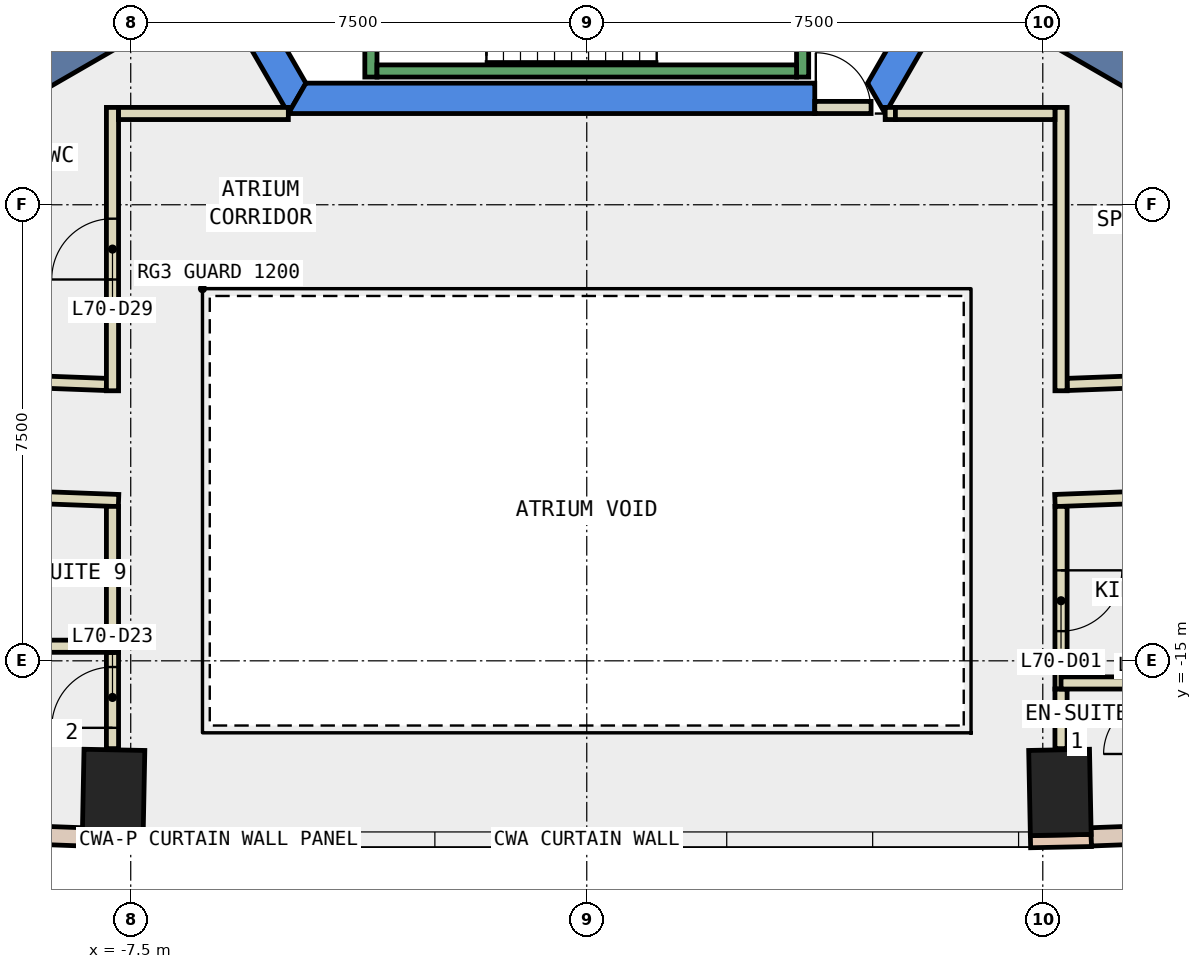
"""IFC4 building model, lengths in metres.
Left out: names, types, materials, properties, quantities, classifications, styles, units other than length and angle.
Written with IfcOpenShell. Run it as: python <this file> out.ifc"""

import sys

from ifc_helpers import new_model, si_unit, direction, frame, frame_2d, origin, origin_2d, place, context, subcontext, project, spatial, polyline, rectangle, outline, extrude, element, fill, save


model = new_model("IFC4")
c1 = context("Model", 3, precision=1e-05, world=origin(), true_north=direction((0.0, 1.0)))
c2 = subcontext(c1, "Body", "Model", "MODEL_VIEW")
j1 = project(units=[si_unit("LENGTHUNIT", "METRE"), si_unit("PLANEANGLEUNIT", "RADIAN")], contexts=[c1])
p1 = place(None, origin())
s1 = spatial("IfcSite", under=j1, at=p1, CompositionType="ELEMENT")
p2 = place(p1, origin())
s2 = spatial("IfcBuilding", under=s1, at=p2, CompositionType="ELEMENT")
p3 = place(p2, frame((0.0, 0.0, 300.8)))
s3 = spatial("IfcBuildingStorey", under=s2, at=p3, CompositionType="ELEMENT", Elevation=300.8)
for number, where, z_axis, x_axis in (
    (1, (-7.782, -17.164, -0.34), (0.0, 0.0, 1.0), (-1.0, 0.02, 0.0)),
    (2, (7.782, -17.164, -0.34), (0.0, 0.0, 1.0), (1.0, 0.02, 0.0)),
):
    element("IfcColumn", number, at=place(p3, frame(where, z_axis=z_axis, x_axis=x_axis)), inside=s3, PredefinedType="COLUMN", context=c2, shape_type="SweptSolid", body=[
        extrude(rectangle(XDim=1.0, YDim=1.4, at=origin_2d()), origin(), (0.0, 0.0, 1.0), 3.6),
    ])
p4 = place(p3, frame((0.0, 0.0, -0.34)))
e3 = element("IfcWall", 3, at=p4, inside=s3, PredefinedType="SHEAR", context=c2, shape_type="SweptSolid", body=[
    extrude(outline(polyline([(-9.815, 2.5), (-4.907, -6.0), (-4.619, -5.5), (-9.238, 2.5), (-9.815, 2.5)])), origin(), (0.0, 0.0, 1.0), 3.6),
])
p5 = place(p3, frame((0.0, 0.0, -0.34)))
e4 = element("IfcWall", 4, at=p5, inside=s3, PredefinedType="SHEAR", context=c2, shape_type="SweptSolid", body=[
    extrude(outline(polyline([(3.75, -6.0), (3.75, -5.5), (-4.619, -5.5), (-4.907, -6.0), (3.75, -6.0)])), origin(), (0.0, 0.0, 1.0), 3.6),
])
p6 = place(p3, frame((0.0, 0.0, -0.34)))
e5 = element("IfcWall", 5, at=p6, inside=s3, PredefinedType="SHEAR", context=c2, shape_type="SweptSolid", body=[
    extrude(outline(polyline([(4.907, -6.0), (9.815, 2.5), (9.238, 2.5), (4.619, -5.5), (4.907, -6.0)])), origin(), (0.0, 0.0, 1.0), 3.6),
])
for number, where, z_axis, x_axis in (
    (6, (6.279, -3.625, -0.34), (0.0, 0.0, 1.0), (0.866, -0.5, 0.0)),
    (7, (-6.279, -3.625, -0.34), (0.0, 0.0, 1.0), (-0.866, -0.5, 0.0)),
):
    element("IfcWall", number, at=place(p3, frame(where, z_axis=z_axis, x_axis=x_axis)), inside=s3, PredefinedType="SHEAR", context=c2, shape_type="SweptSolid", body=[
        extrude(rectangle(XDim=9.0, YDim=0.8, at=frame_2d((4.5, 0.0))), origin(), (0.0, 0.0, 1.0), 3.6),
    ])
for number, where, z_axis, x_axis in (
    (8, (-8.298, -17.954, 0.0), (0.0, 0.0, 1.0), (1.0, -0.02, 0.0)),
    (9, (7.298, -17.974, 0.0), (0.0, 0.0, 1.0), (1.0, 0.02, 0.0)),
):
    element("IfcWall", number, at=place(p3, frame(where, z_axis=z_axis, x_axis=x_axis)), inside=s3, PredefinedType="STANDARD", context=c2, shape_type="SweptSolid", body=[
        extrude(rectangle(XDim=1.0, YDim=0.2, at=frame_2d((0.5, 0.0))), origin(), (0.0, 0.0, 1.0), 3.26),
    ])
p7 = place(p3, frame((-11.92, -17.76, 0.0), z_axis=(0.0, 0.0, 1.0), x_axis=(0.999306787149, -0.037228284377, 0.0)))
e10 = element("IfcWall", 10, at=p7, inside=s3, PredefinedType="STANDARD", context=c2, shape_type="SweptSolid", body=[
    extrude(rectangle(XDim=3.626, YDim=0.3, at=frame_2d((1.813, 0.0))), origin(), (0.0, 0.0, 1.0), 3.26),
])
p8 = place(p7, frame((1.113, 0.0, 0.9)))
e11 = element("IfcOpeningElement", 11, at=p8, cuts=e10, PredefinedType="OPENING", context=c2, shape_type="SweptSolid", body=[
    extrude(rectangle(XDim=1.4, YDim=2.0, at=frame_2d((0.7, 1.0))), frame((0.0, 0.16, 0.0), z_axis=(0.0, -1.0, 0.0), x_axis=(1.0, 0.0, 0.0)), (0.0, 0.0, 1.0), 0.32),
])
p9 = place(p3, frame((8.296, -17.895, 0.0), z_axis=(0.0, 0.0, 1.0), x_axis=(0.999306787149, 0.037228284377, 0.0)))
e12 = element("IfcWall", 12, at=p9, inside=s3, PredefinedType="STANDARD", context=c2, shape_type="SweptSolid", body=[
    extrude(rectangle(XDim=3.626, YDim=0.3, at=frame_2d((1.813, 0.0))), origin(), (0.0, 0.0, 1.0), 3.26),
])
p10 = place(p9, frame((1.113, 0.0, 0.9)))
e13 = element("IfcOpeningElement", 13, at=p10, cuts=e12, PredefinedType="OPENING", context=c2, shape_type="SweptSolid", body=[
    extrude(rectangle(XDim=1.4, YDim=2.0, at=frame_2d((0.7, 1.0))), frame((0.0, 0.16, 0.0), z_axis=(0.0, -1.0, 0.0), x_axis=(1.0, 0.0, 0.0)), (0.0, 0.0, 1.0), 0.32),
])
p11 = place(p3, frame((7.9, -10.455, 0.0), z_axis=(0.0, 0.0, 1.0), x_axis=(0.999297278907, 0.037482640915, 0.0)))
e14 = element("IfcWall", 14, at=p11, inside=s3, PredefinedType="PARTITIONING", context=c2, shape_type="SweptSolid", body=[
    extrude(rectangle(XDim=3.394, YDim=0.2, at=frame_2d((1.697, 0.0))), origin(), (0.0, 0.0, 1.0), 3.26),
])
p12 = place(p11, frame((1.196, 0.0, 0.0)))
e15 = element("IfcOpeningElement", 15, at=p12, cuts=e14, PredefinedType="OPENING", context=c2, shape_type="SweptSolid", body=[
    extrude(rectangle(XDim=1.0, YDim=2.1, at=frame_2d((0.5, 1.05))), frame((0.0, 0.11, 0.0), z_axis=(0.0, -1.0, 0.0), x_axis=(1.0, 0.0, 0.0)), (0.0, 0.0, 1.0), 0.22),
])
p13 = place(p3, frame((-9.902, -10.38, 0.0), z_axis=(0.0, 0.0, 1.0), x_axis=(0.999295503749, -0.037529937222, 0.0)))
e16 = element("IfcWall", 16, at=p13, inside=s3, PredefinedType="PARTITIONING", context=c2, shape_type="SweptSolid", body=[
    extrude(rectangle(XDim=2.004, YDim=0.2, at=frame_2d((1.002, 0.0))), origin(), (0.0, 0.0, 1.0), 3.26),
])
p14 = place(p3, frame((11.53, -12.22, 0.0), z_axis=(0.0, 0.0, 1.0), x_axis=(-0.999293554816, -0.037581794833, 0.0)))
e17 = element("IfcWall", 17, at=p14, inside=s3, PredefinedType="PARTITIONING", context=c2, shape_type="SweptSolid", body=[
    extrude(rectangle(XDim=3.833, YDim=0.2, at=frame_2d((1.917, 0.0))), origin(), (0.0, 0.0, 1.0), 3.26),
])
p15 = place(p3, frame((-7.7, -12.364, 0.0), z_axis=(0.0, 0.0, 1.0), x_axis=(-0.999295758095, 0.037523164215, 0.0)))
e18 = element("IfcWall", 18, at=p15, inside=s3, PredefinedType="PARTITIONING", context=c2, shape_type="SweptSolid", body=[
    extrude(rectangle(XDim=2.401, YDim=0.2, at=frame_2d((1.2, 0.0))), origin(), (0.0, 0.0, 1.0), 3.26),
])
p16 = place(p3, frame((4.908, -5.999, 0.0), z_axis=(0.0, 0.0, 1.0), x_axis=(1.0, 0.0, 0.0)))
e19 = element("IfcWall", 19, at=p16, inside=s3, PredefinedType="PARTITIONING", context=c2, shape_type="SweptSolid", body=[
    extrude(rectangle(XDim=0.168, YDim=0.2, at=frame_2d((0.084, 0.0))), origin(), (0.0, 0.0, 1.0), 2.4),
])
p17 = place(p3, frame((7.8, -5.899, 0.0), z_axis=(0.0, 0.0, 1.0), x_axis=(0.0, -1.0, 0.0)))
e20 = element("IfcWall", 20, at=p17, inside=s3, PredefinedType="PARTITIONING", context=c2, shape_type="SweptSolid", body=[
    extrude(rectangle(XDim=4.66, YDim=0.2, at=frame_2d((2.33, 0.0))), origin(), (0.0, 0.0, 1.0), 3.26),
])
p18 = place(p3, frame((-7.8, -10.559, 0.0), z_axis=(0.0, 0.0, 1.0), x_axis=(0.0, 1.0, 0.0)))
e21 = element("IfcWall", 21, at=p18, inside=s3, PredefinedType="PARTITIONING", context=c2, shape_type="SweptSolid", body=[
    extrude(rectangle(XDim=4.66, YDim=0.2, at=frame_2d((2.33, 0.0))), origin(), (0.0, 0.0, 1.0), 3.26),
])
p19 = place(p18, frame((1.83, 0.0, 0.0)))
e22 = element("IfcOpeningElement", 22, at=p19, cuts=e21, PredefinedType="OPENING", context=c2, shape_type="SweptSolid", body=[
    extrude(rectangle(XDim=1.0, YDim=2.1, at=frame_2d((0.5, 1.05))), frame((0.0, 0.11, 0.0), z_axis=(0.0, -1.0, 0.0), x_axis=(1.0, 0.0, 0.0)), (0.0, 0.0, 1.0), 0.22),
])
p20 = place(p3, frame((-7.7, -5.999, 0.0), z_axis=(0.0, 0.0, 1.0), x_axis=(1.0, 0.0, 0.0)))
e23 = element("IfcWall", 23, at=p20, inside=s3, PredefinedType="PARTITIONING", context=c2, shape_type="SweptSolid", body=[
    extrude(rectangle(XDim=2.792, YDim=0.2, at=frame_2d((1.396, 0.0))), origin(), (0.0, 0.0, 1.0), 3.26),
])
p21 = place(p3, frame((7.8, -12.46, 0.0), z_axis=(0.0, 0.0, 1.0), x_axis=(0.0, -1.0, 0.0)))
e24 = element("IfcWall", 24, at=p21, inside=s3, PredefinedType="PARTITIONING", context=c2, shape_type="SweptSolid", body=[
    extrude(rectangle(XDim=3.004, YDim=0.2, at=frame_2d((1.502, 0.0))), origin(), (0.0, 0.0, 1.0), 3.26),
])
p22 = place(p21, frame((1.052, 0.0, 0.0)))
e25 = element("IfcOpeningElement", 25, at=p22, cuts=e24, PredefinedType="OPENING", context=c2, shape_type="SweptSolid", body=[
    extrude(rectangle(XDim=1.0, YDim=2.1, at=frame_2d((0.5, 1.05))), frame((0.0, 0.11, 0.0), z_axis=(0.0, -1.0, 0.0), x_axis=(1.0, 0.0, 0.0)), (0.0, 0.0, 1.0), 0.22),
])
p23 = place(p3, frame((7.8, -15.464, 0.0), z_axis=(0.0, 0.0, 1.0), x_axis=(0.0, -1.0, 0.0)))
e26 = element("IfcWall", 26, at=p23, inside=s3, PredefinedType="PARTITIONING", context=c2, shape_type="SweptSolid", body=[
    extrude(rectangle(XDim=0.98, YDim=0.2, at=frame_2d((0.49, 0.0))), origin(), (0.0, 0.0, 1.0), 3.26),
])
p24 = place(p3, frame((-7.8, -16.444, 0.0), z_axis=(0.0, 0.0, 1.0), x_axis=(0.0, 1.0, 0.0)))
e27 = element("IfcWall", 27, at=p24, inside=s3, PredefinedType="PARTITIONING", context=c2, shape_type="SweptSolid", body=[
    extrude(rectangle(XDim=1.584, YDim=0.2, at=frame_2d((0.792, 0.0))), origin(), (0.0, 0.0, 1.0), 3.26),
])
p25 = place(p24, frame((0.342, 0.0, 0.0)))
e28 = element("IfcOpeningElement", 28, at=p25, cuts=e27, PredefinedType="OPENING", context=c2, shape_type="SweptSolid", body=[
    extrude(rectangle(XDim=1.0, YDim=2.1, at=frame_2d((0.5, 1.05))), frame((0.0, 0.11, 0.0), z_axis=(0.0, -1.0, 0.0), x_axis=(1.0, 0.0, 0.0)), (0.0, 0.0, 1.0), 0.22),
])
p26 = place(p3, frame((-7.8, -14.86, 0.0), z_axis=(0.0, 0.0, 1.0), x_axis=(0.0, 1.0, 0.0)))
e29 = element("IfcWall", 29, at=p26, inside=s3, PredefinedType="PARTITIONING", context=c2, shape_type="SweptSolid", body=[
    extrude(rectangle(XDim=2.4, YDim=0.2, at=frame_2d((1.2, 0.0))), origin(), (0.0, 0.0, 1.0), 3.26),
])
p27 = place(p3, frame((6.835, -2.662, 0.0), z_axis=(0.0, 0.0, 1.0), x_axis=(0.866023427642, -0.500003422764, 0.0)))
e30 = element("IfcWall", 30, at=p27, inside=s3, PredefinedType="PARTITIONING", context=c2, shape_type="SweptSolid", body=[
    extrude(rectangle(XDim=8.65, YDim=0.1, at=frame_2d((4.325, 0.0))), origin(), (0.0, 0.0, 1.0), 3.26),
])
p28 = place(p3, frame((-6.804, -2.714, 0.0), z_axis=(0.0, 0.0, 1.0), x_axis=(-0.866057565063, -0.499944290893, 0.0)))
e31 = element("IfcWall", 31, at=p28, inside=s3, PredefinedType="PARTITIONING", context=c2, shape_type="SweptSolid", body=[
    extrude(rectangle(XDim=6.7, YDim=0.2, at=frame_2d((3.35, 0.0))), origin(), (0.0, 0.0, 1.0), 3.26),
])
p29 = place(p3, frame((9.3, -15.364, 0.0), z_axis=(0.0, 0.0, 1.0), x_axis=(-1.0, 0.0, 0.0)))
e32 = element("IfcWall", 32, at=p29, inside=s3, PredefinedType="PARTITIONING", context=c2, shape_type="SweptSolid", body=[
    extrude(rectangle(XDim=1.5, YDim=0.2, at=frame_2d((0.75, 0.0))), origin(), (0.0, 0.0, 1.0), 3.26),
])
p30 = place(p3, frame((-10.1, -14.76, 0.0), z_axis=(0.0, 0.0, 1.0), x_axis=(1.0, 0.0, 0.0)))
e33 = element("IfcWall", 33, at=p30, inside=s3, PredefinedType="PARTITIONING", context=c2, shape_type="SweptSolid", body=[
    extrude(rectangle(XDim=2.3, YDim=0.2, at=frame_2d((1.15, 0.0))), origin(), (0.0, 0.0, 1.0), 3.26),
])
p31 = place(p3, frame((3.75, -5.9, 0.0), z_axis=(0.0, 0.0, 1.0), x_axis=(1.0, 0.0, 0.0)))
e34 = element("IfcWall", 34, at=p31, inside=s3, PredefinedType="PARTITIONING", context=c2, shape_type="SweptSolid", body=[
    extrude(rectangle(XDim=0.926, YDim=0.2, at=frame_2d((0.463, 0.0))), origin(), (0.0, 0.0, 1.0), 2.4),
])
p32 = place(p31, frame((0.017, 0.0, 0.0)))
e35 = element("IfcOpeningElement", 35, at=p32, cuts=e34, PredefinedType="OPENING", context=c2, shape_type="SweptSolid", body=[
    extrude(rectangle(XDim=0.9, YDim=2.1, at=frame_2d((0.45, 1.05))), frame((0.0, 0.11, 0.0), z_axis=(0.0, -1.0, 0.0), x_axis=(1.0, 0.0, 0.0)), (0.0, 0.0, 1.0), 0.22),
])
p33 = place(p3, frame((5.076, -5.999, 0.0), z_axis=(0.0, 0.0, 1.0), x_axis=(1.0, 0.0, 0.0)))
e36 = element("IfcWall", 36, at=p33, inside=s3, PredefinedType="PARTITIONING", context=c2, shape_type="SweptSolid", body=[
    extrude(rectangle(XDim=2.624, YDim=0.2, at=frame_2d((1.312, 0.0))), origin(), (0.0, 0.0, 1.0), 3.26),
])
p34 = place(p3, frame((-3.55, -1.0, 0.0), z_axis=(0.0, 0.0, 1.0), x_axis=(0.0, -1.0, 0.0)))
e37 = element("IfcWall", 37, at=p34, inside=s3, PredefinedType="STANDARD", context=c2, shape_type="SweptSolid", body=[
    extrude(rectangle(XDim=4.4, YDim=0.2, at=frame_2d((2.2, 0.0))), origin(), (0.0, 0.0, 1.0), 3.26),
])
p35 = place(p34, frame((2.4, 0.0, 0.0)))
e38 = element("IfcOpeningElement", 38, at=p35, cuts=e37, PredefinedType="OPENING", context=c2, shape_type="SweptSolid", body=[
    extrude(rectangle(XDim=1.1, YDim=2.2, at=frame_2d((0.55, 1.1))), frame((0.0, 0.11, 0.0), z_axis=(0.0, -1.0, 0.0), x_axis=(1.0, 0.0, 0.0)), (0.0, 0.0, 1.0), 0.22),
])
p36 = place(p3, frame((3.55, -2.667, 0.0), z_axis=(0.0, 0.0, 1.0), x_axis=(0.0, -1.0, 0.0)))
e39 = element("IfcWall", 39, at=p36, inside=s3, PredefinedType="STANDARD", context=c2, shape_type="SweptSolid", body=[
    extrude(rectangle(XDim=2.733, YDim=0.2, at=frame_2d((1.366, 0.0))), origin(), (0.0, 0.0, 1.0), 3.26),
])
p37 = place(p3, frame((-3.45, -5.3, 0.0), z_axis=(0.0, 0.0, 1.0), x_axis=(1.0, 0.0, 0.0)))
e40 = element("IfcWall", 40, at=p37, inside=s3, PredefinedType="STANDARD", context=c2, shape_type="SweptSolid", body=[
    extrude(rectangle(XDim=6.9, YDim=0.2, at=frame_2d((3.45, 0.0))), origin(), (0.0, 0.0, 1.0), 3.26),
])
p38 = place(p22, origin())
e41 = element("IfcDoor", 41, at=p38, inside=s3, OperationType="SINGLE_SWING_RIGHT", PredefinedType="DOOR", context=c2, shape_type="SweptSolid", body=[
    extrude(rectangle(XDim=1.0, YDim=2.1, at=frame_2d((0.5, 1.05))), frame((0.0, 0.025, 0.0), z_axis=(0.0, -1.0, 0.0), x_axis=(1.0, 0.0, 0.0)), (0.0, 0.0, 1.0), 0.05),
])
fill(e25, e41)
p39 = place(p25, origin())
e42 = element("IfcDoor", 42, at=p39, inside=s3, OperationType="SINGLE_SWING_RIGHT", PredefinedType="DOOR", context=c2, shape_type="SweptSolid", body=[
    extrude(rectangle(XDim=1.0, YDim=2.1, at=frame_2d((0.5, 1.05))), frame((0.0, 0.025, 0.0), z_axis=(0.0, -1.0, 0.0), x_axis=(1.0, 0.0, 0.0)), (0.0, 0.0, 1.0), 0.05),
])
fill(e28, e42)
p40 = place(p19, origin())
e43 = element("IfcDoor", 43, at=p40, inside=s3, OperationType="SINGLE_SWING_LEFT", PredefinedType="DOOR", context=c2, shape_type="SweptSolid", body=[
    extrude(rectangle(XDim=1.0, YDim=2.1, at=frame_2d((0.5, 1.05))), frame((0.0, 0.025, 0.0), z_axis=(0.0, -1.0, 0.0), x_axis=(1.0, 0.0, 0.0)), (0.0, 0.0, 1.0), 0.05),
])
fill(e22, e43)
p41 = place(p32, origin())
e44 = element("IfcDoor", 44, at=p41, inside=s3, OperationType="SINGLE_SWING_LEFT", PredefinedType="DOOR", context=c2, shape_type="SweptSolid", body=[
    extrude(rectangle(XDim=0.9, YDim=2.1, at=frame_2d((0.45, 1.05))), frame((0.0, 0.025, 0.0), z_axis=(0.0, -1.0, 0.0), x_axis=(1.0, 0.0, 0.0)), (0.0, 0.0, 1.0), 0.05),
])
fill(e35, e44)
save(model, sys.argv[1])
